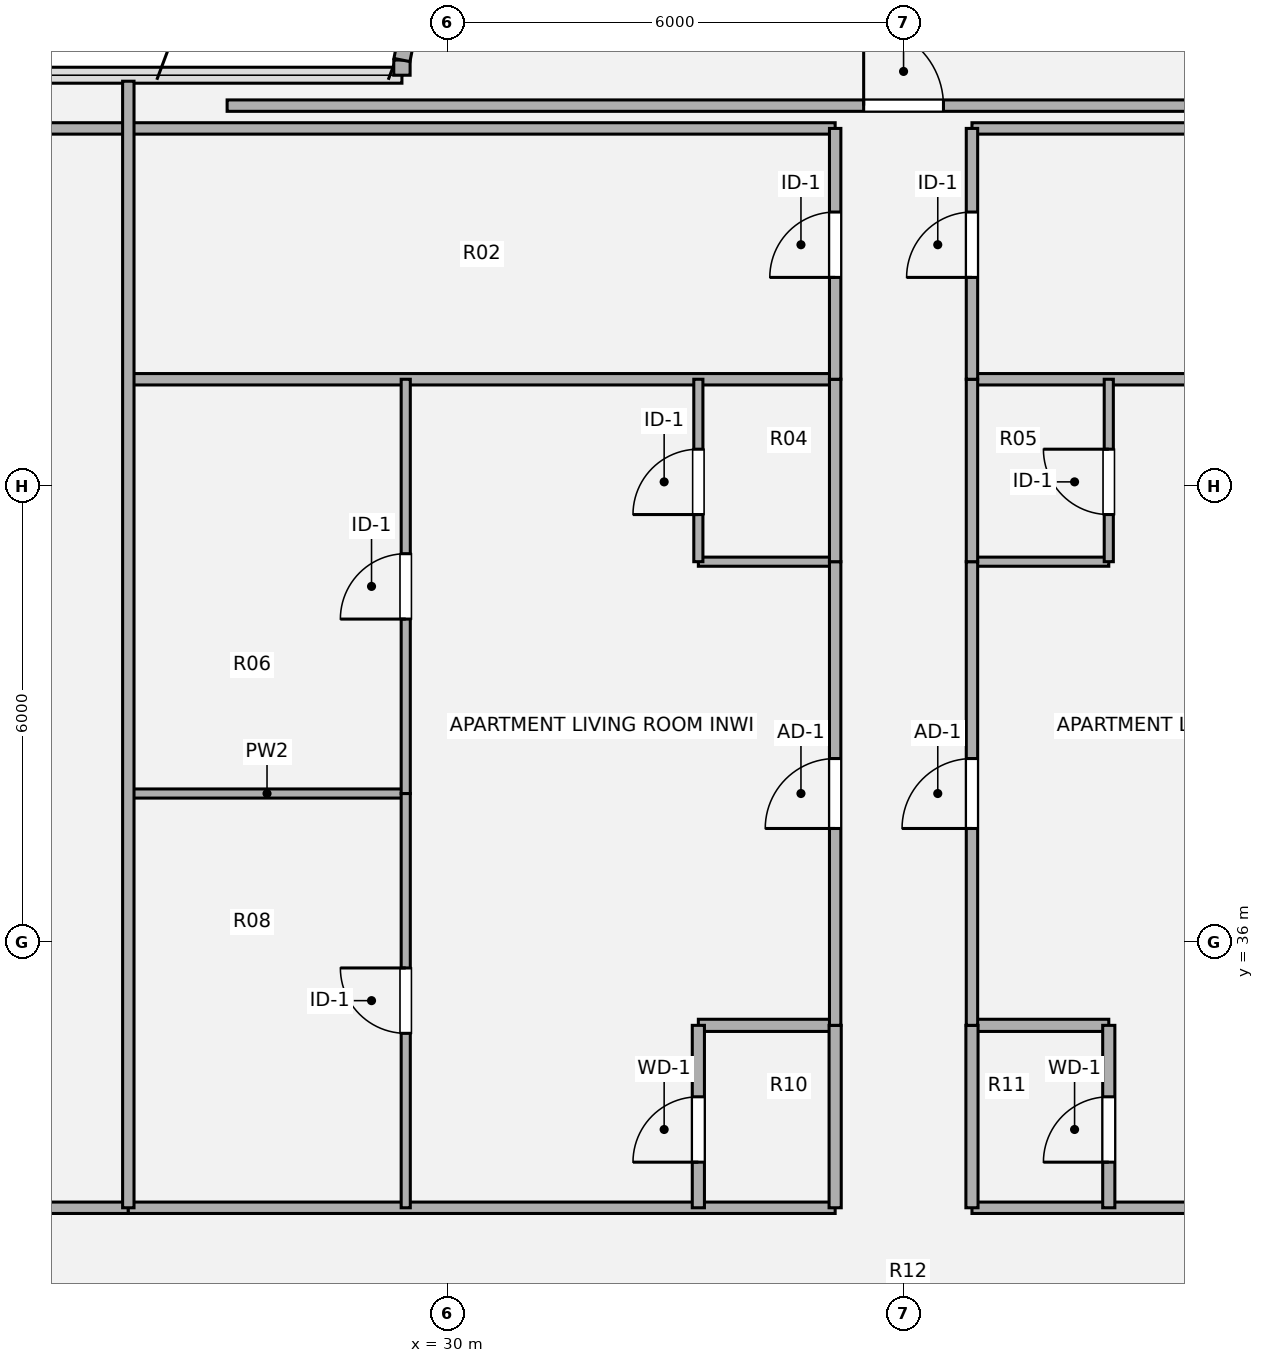
"""IFC4 building model, lengths in metres.
Left out: names, types, materials, properties, quantities, classifications, styles, units other than length and angle.
Written with IfcOpenShell. Run it as: python <this file> out.ifc"""

import sys

from ifc_helpers import new_model, si_unit, direction, frame, frame_2d, origin, origin_2d, place, context, subcontext, project, spatial, rectangle, extrude, source, transform, mapped, element, fill, save


model = new_model("IFC4")
c1 = context("Model", 3, precision=1e-05, world=origin(), true_north=direction((0.0, 1.0)))
c2 = subcontext(c1, "Body", "Model", "MODEL_VIEW")
j1 = project(units=[si_unit("LENGTHUNIT", "METRE"), si_unit("PLANEANGLEUNIT", "RADIAN")], contexts=[c1])
p1 = place(None, origin())
s1 = spatial("IfcSite", under=j1, at=p1, CompositionType="ELEMENT")
p2 = place(p1, origin())
s2 = spatial("IfcBuilding", under=s1, at=p2, CompositionType="ELEMENT")
p3 = place(p2, frame((0.0, 0.0, 138.96)))
s3 = spatial("IfcBuildingStorey", under=s2, at=p3, CompositionType="ELEMENT", Elevation=138.96)
p4 = place(p3, frame((29.4, 47.4, 0.0), z_axis=(0.0, 0.0, 1.0), x_axis=(0.0, 1.0, 0.0)))
e1 = element("IfcWall", 1, at=p4, inside=s3, PredefinedType="SOLIDWALL", context=c2, shape_type="SweptSolid", body=[
    extrude(rectangle(XDim=0.2, YDim=0.215, at=frame_2d((0.1, 0.0))), origin(), (0.0, 0.0, 1.0), 3.53),
])
p5 = place(p3, frame((29.4, 47.6, 0.0), z_axis=(0.0, 0.0, 1.0), x_axis=(0.195127417394, 0.980777900945, 0.0)))
e2 = element("IfcWall", 2, at=p5, inside=s3, PredefinedType="SOLIDWALL", context=c2, shape_type="SweptSolid", body=[
    extrude(rectangle(XDim=1.092, YDim=0.215, at=frame_2d((0.546, 0.0))), origin(), (0.0, 0.0, 1.0), 3.53),
])
p6 = place(p3, frame((13.98, 32.5, 0.0), z_axis=(0.0, 0.0, 1.0), x_axis=(1.0, 0.0, 0.0)))
e3 = element("IfcWall", 3, at=p6, inside=s3, PredefinedType="PARTITIONING", context=c2, shape_type="SweptSolid", body=[
    extrude(rectangle(XDim=11.82, YDim=0.15, at=frame_2d((5.91, 0.0))), origin(), (0.0, 0.0, 1.0), 2.982),
])
p7 = place(p6, frame((6.695, 0.0, 0.0)))
e4 = element("IfcOpeningElement", 4, at=p7, cuts=e3, PredefinedType="OPENING", context=c2, shape_type="SweptSolid", body=[
    extrude(rectangle(XDim=1.05, YDim=2.1, at=origin_2d()), frame((0.525, 0.085, 1.05), z_axis=(0.0, -1.0, 0.0), x_axis=(1.0, 0.0, 0.0)), (0.0, 0.0, 1.0), 0.17),
])
for number, where, z_axis, x_axis in (
    (5, (25.8, 32.5, 0.0), (0.0, 0.0, 1.0), (1.0, 0.0, 0.0)),
    (6, (36.9, 32.5, 0.0), (0.0, 0.0, 1.0), (1.0, 0.0, 0.0)),
):
    element("IfcWall", number, at=place(p3, frame(where, z_axis=z_axis, x_axis=x_axis)), inside=s3, PredefinedType="PARTITIONING", context=c2, shape_type="SweptSolid", body=[
        extrude(rectangle(XDim=9.3, YDim=0.15, at=frame_2d((4.65, 0.0))), origin(), (0.0, 0.0, 1.0), 2.982),
    ])
for number, where, z_axis, x_axis in (
    (7, (33.3, 34.9, 0.0), (0.0, 0.0, 1.0), (1.0, 0.0, 0.0)),
    (8, (36.9, 34.9, 0.0), (0.0, 0.0, 1.0), (1.0, 0.0, 0.0)),
):
    element("IfcWall", number, at=place(p3, frame(where, z_axis=z_axis, x_axis=x_axis)), inside=s3, PredefinedType="PLUMBINGWALL", context=c2, shape_type="SweptSolid", body=[
        extrude(rectangle(XDim=1.8, YDim=0.16, at=frame_2d((0.9, 0.0))), origin(), (0.0, 0.0, 1.0), 3.259),
    ])
p8 = place(p3, frame((25.8, 37.95, 0.0), z_axis=(0.0, 0.0, 1.0), x_axis=(1.0, 0.0, 0.0)))
e9 = element("IfcWall", 9, at=p8, inside=s3, PredefinedType="PARTITIONING", context=c2, shape_type="SweptSolid", body=[
    extrude(rectangle(XDim=3.65, YDim=0.12, at=frame_2d((1.825, 0.0))), origin(), (0.0, 0.0, 1.0), 2.982),
])
for number, where, z_axis, x_axis in (
    (10, (33.3, 41.0, 0.0), (0.0, 0.0, 1.0), (1.0, 0.0, 0.0)),
    (11, (36.9, 41.0, 0.0), (0.0, 0.0, 1.0), (1.0, 0.0, 0.0)),
):
    element("IfcWall", number, at=place(p3, frame(where, z_axis=z_axis, x_axis=x_axis)), inside=s3, PredefinedType="PARTITIONING", context=c2, shape_type="SweptSolid", body=[
        extrude(rectangle(XDim=1.8, YDim=0.12, at=frame_2d((0.9, 0.0))), origin(), (0.0, 0.0, 1.0), 3.259),
    ])
for number, where, z_axis, x_axis in (
    (12, (25.8, 43.4, 0.0), (0.0, 0.0, 1.0), (1.0, 0.0, 0.0)),
    (13, (36.9, 43.4, 0.0), (0.0, 0.0, 1.0), (1.0, 0.0, 0.0)),
):
    element("IfcWall", number, at=place(p3, frame(where, z_axis=z_axis, x_axis=x_axis)), inside=s3, PredefinedType="PARTITIONING", context=c2, shape_type="SweptSolid", body=[
        extrude(rectangle(XDim=9.3, YDim=0.15, at=frame_2d((4.65, 0.0))), origin(), (0.0, 0.0, 1.0), 3.308),
    ])
for number, where, z_axis, x_axis in (
    (14, (23.3, 46.7, 0.0), (0.0, 0.0, 1.0), (1.0, 0.0, 0.0)),
    (15, (36.9, 46.7, 0.0), (0.0, 0.0, 1.0), (1.0, 0.0, 0.0)),
):
    element("IfcWall", number, at=place(p3, frame(where, z_axis=z_axis, x_axis=x_axis)), inside=s3, PredefinedType="PARTITIONING", context=c2, shape_type="SweptSolid", body=[
        extrude(rectangle(XDim=11.8, YDim=0.15, at=frame_2d((5.9, 0.0))), origin(), (0.0, 0.0, 1.0), 3.308),
    ])
p9 = place(p3, frame((27.1, 47.0, 0.0), z_axis=(0.0, 0.0, 1.0), x_axis=(1.0, 0.0, 0.0)))
e16 = element("IfcWall", 16, at=p9, inside=s3, PredefinedType="PARTITIONING", context=c2, shape_type="SweptSolid", body=[
    extrude(rectangle(XDim=17.8, YDim=0.15, at=frame_2d((8.9, 0.0))), origin(), (0.0, 0.0, 1.0), 3.308),
])
p10 = place(p9, frame((8.375, 0.0, 0.0)))
e17 = element("IfcOpeningElement", 17, at=p10, cuts=e16, PredefinedType="OPENING", context=c2, shape_type="SweptSolid", body=[
    extrude(rectangle(XDim=1.05, YDim=2.1, at=origin_2d()), frame((0.525, 0.085, 1.05), z_axis=(0.0, -1.0, 0.0), x_axis=(1.0, 0.0, 0.0)), (0.0, 0.0, 1.0), 0.17),
])
p11 = place(p3, frame((25.8, 32.5, 0.0), z_axis=(0.0, 0.0, 1.0), x_axis=(0.0, 1.0, 0.0)))
e18 = element("IfcWall", 18, at=p11, inside=s3, PredefinedType="PARTITIONING", context=c2, shape_type="SweptSolid", body=[
    extrude(rectangle(XDim=14.821, YDim=0.15, at=frame_2d((7.411, 0.0))), origin(), (0.0, 0.0, 1.0), 3.5),
])
p12 = place(p3, frame((29.45, 32.5, 0.0), z_axis=(0.0, 0.0, 1.0), x_axis=(0.0, 1.0, 0.0)))
e19 = element("IfcWall", 19, at=p12, inside=s3, PredefinedType="PARTITIONING", context=c2, shape_type="SweptSolid", body=[
    extrude(rectangle(XDim=5.45, YDim=0.12, at=frame_2d((2.725, 0.0))), origin(), (0.0, 0.0, 1.0), 3.5),
])
p13 = place(p12, frame((2.295, 0.0, 0.0)))
e20 = element("IfcOpeningElement", 20, at=p13, cuts=e19, PredefinedType="OPENING", context=c2, shape_type="SweptSolid", body=[
    extrude(rectangle(XDim=0.86, YDim=2.1, at=origin_2d()), frame((0.43, 0.07, 1.05), z_axis=(0.0, -1.0, 0.0), x_axis=(1.0, 0.0, 0.0)), (0.0, 0.0, 1.0), 0.14),
])
p14 = place(p3, frame((29.45, 37.95, 0.0), z_axis=(0.0, 0.0, 1.0), x_axis=(0.0, 1.0, 0.0)))
e21 = element("IfcWall", 21, at=p14, inside=s3, PredefinedType="PARTITIONING", context=c2, shape_type="SweptSolid", body=[
    extrude(rectangle(XDim=5.45, YDim=0.12, at=frame_2d((2.725, 0.0))), origin(), (0.0, 0.0, 1.0), 3.5),
])
p15 = place(p14, frame((2.295, 0.0, 0.0)))
e22 = element("IfcOpeningElement", 22, at=p15, cuts=e21, PredefinedType="OPENING", context=c2, shape_type="SweptSolid", body=[
    extrude(rectangle(XDim=0.86, YDim=2.1, at=origin_2d()), frame((0.43, 0.07, 1.05), z_axis=(0.0, -1.0, 0.0), x_axis=(1.0, 0.0, 0.0)), (0.0, 0.0, 1.0), 0.14),
])
p16 = place(p3, frame((33.3, 32.5, 0.0), z_axis=(0.0, 0.0, 1.0), x_axis=(0.0, 1.0, 0.0)))
e23 = element("IfcWall", 23, at=p16, inside=s3, PredefinedType="PLUMBINGWALL", context=c2, shape_type="SweptSolid", body=[
    extrude(rectangle(XDim=2.4, YDim=0.16, at=frame_2d((1.2, 0.0))), origin(), (0.0, 0.0, 1.0), 3.5),
])
p17 = place(p16, frame((0.6, 0.0, 0.0)))
e24 = element("IfcOpeningElement", 24, at=p17, cuts=e23, PredefinedType="OPENING", context=c2, shape_type="SweptSolid", body=[
    extrude(rectangle(XDim=0.86, YDim=2.1, at=origin_2d()), frame((0.43, 0.09, 1.05), z_axis=(0.0, -1.0, 0.0), x_axis=(1.0, 0.0, 0.0)), (0.0, 0.0, 1.0), 0.18),
])
p18 = place(p3, frame((33.3, 41.0, 0.0), z_axis=(0.0, 0.0, 1.0), x_axis=(0.0, 1.0, 0.0)))
e25 = element("IfcWall", 25, at=p18, inside=s3, PredefinedType="PARTITIONING", context=c2, shape_type="SweptSolid", body=[
    extrude(rectangle(XDim=2.4, YDim=0.12, at=frame_2d((1.2, 0.0))), origin(), (0.0, 0.0, 1.0), 3.5),
])
p19 = place(p18, frame((0.62, 0.0, 0.0)))
e26 = element("IfcOpeningElement", 26, at=p19, cuts=e25, PredefinedType="OPENING", context=c2, shape_type="SweptSolid", body=[
    extrude(rectangle(XDim=0.86, YDim=2.1, at=origin_2d()), frame((0.43, 0.07, 1.05), z_axis=(0.0, -1.0, 0.0), x_axis=(1.0, 0.0, 0.0)), (0.0, 0.0, 1.0), 0.14),
])
p20 = place(p3, frame((35.1, 32.5, 0.0), z_axis=(0.0, 0.0, 1.0), x_axis=(0.0, 1.0, 0.0)))
e27 = element("IfcWall", 27, at=p20, inside=s3, PredefinedType="PLUMBINGWALL", context=c2, shape_type="SweptSolid", body=[
    extrude(rectangle(XDim=2.4, YDim=0.16, at=frame_2d((1.2, 0.0))), origin(), (0.0, 0.0, 1.0), 3.5),
])
p21 = place(p3, frame((35.1, 34.9, 0.0), z_axis=(0.0, 0.0, 1.0), x_axis=(0.0, 1.0, 0.0)))
e28 = element("IfcWall", 28, at=p21, inside=s3, PredefinedType="PARTITIONING", context=c2, shape_type="SweptSolid", body=[
    extrude(rectangle(XDim=6.1, YDim=0.15, at=frame_2d((3.05, 0.0))), origin(), (0.0, 0.0, 1.0), 3.5),
])
p22 = place(p21, frame((2.59, 0.0, 0.0)))
e29 = element("IfcOpeningElement", 29, at=p22, cuts=e28, PredefinedType="OPENING", context=c2, shape_type="SweptSolid", body=[
    extrude(rectangle(XDim=0.92, YDim=2.1, at=origin_2d()), frame((0.46, 0.085, 1.05), z_axis=(0.0, -1.0, 0.0), x_axis=(1.0, 0.0, 0.0)), (0.0, 0.0, 1.0), 0.17),
])
p23 = place(p3, frame((35.1, 41.0, 0.0), z_axis=(0.0, 0.0, 1.0), x_axis=(0.0, 1.0, 0.0)))
e30 = element("IfcWall", 30, at=p23, inside=s3, PredefinedType="PARTITIONING", context=c2, shape_type="SweptSolid", body=[
    extrude(rectangle(XDim=2.4, YDim=0.15, at=frame_2d((1.2, 0.0))), origin(), (0.0, 0.0, 1.0), 3.5),
])
p24 = place(p3, frame((35.1, 43.4, 0.0), z_axis=(0.0, 0.0, 1.0), x_axis=(0.0, 1.0, 0.0)))
e31 = element("IfcWall", 31, at=p24, inside=s3, PredefinedType="PARTITIONING", context=c2, shape_type="SweptSolid", body=[
    extrude(rectangle(XDim=3.3, YDim=0.15, at=frame_2d((1.65, 0.0))), origin(), (0.0, 0.0, 1.0), 3.5),
])
p25 = place(p24, frame((1.34, 0.0, 0.0)))
e32 = element("IfcOpeningElement", 32, at=p25, cuts=e31, PredefinedType="OPENING", context=c2, shape_type="SweptSolid", body=[
    extrude(rectangle(XDim=0.86, YDim=2.1, at=origin_2d()), frame((0.43, 0.085, 1.05), z_axis=(0.0, -1.0, 0.0), x_axis=(1.0, 0.0, 0.0)), (0.0, 0.0, 1.0), 0.17),
])
p26 = place(p3, frame((36.9, 32.5, 0.0), z_axis=(0.0, 0.0, 1.0), x_axis=(0.0, 1.0, 0.0)))
e33 = element("IfcWall", 33, at=p26, inside=s3, PredefinedType="PLUMBINGWALL", context=c2, shape_type="SweptSolid", body=[
    extrude(rectangle(XDim=2.4, YDim=0.16, at=frame_2d((1.2, 0.0))), origin(), (0.0, 0.0, 1.0), 3.5),
])
p27 = place(p3, frame((36.9, 34.9, 0.0), z_axis=(0.0, 0.0, 1.0), x_axis=(0.0, 1.0, 0.0)))
e34 = element("IfcWall", 34, at=p27, inside=s3, PredefinedType="PARTITIONING", context=c2, shape_type="SweptSolid", body=[
    extrude(rectangle(XDim=6.1, YDim=0.15, at=frame_2d((3.05, 0.0))), origin(), (0.0, 0.0, 1.0), 3.5),
])
p28 = place(p27, frame((2.59, 0.0, 0.0)))
e35 = element("IfcOpeningElement", 35, at=p28, cuts=e34, PredefinedType="OPENING", context=c2, shape_type="SweptSolid", body=[
    extrude(rectangle(XDim=0.92, YDim=2.1, at=origin_2d()), frame((0.46, 0.085, 1.05), z_axis=(0.0, -1.0, 0.0), x_axis=(1.0, 0.0, 0.0)), (0.0, 0.0, 1.0), 0.17),
])
p29 = place(p3, frame((36.9, 41.0, 0.0), z_axis=(0.0, 0.0, 1.0), x_axis=(0.0, 1.0, 0.0)))
e36 = element("IfcWall", 36, at=p29, inside=s3, PredefinedType="PARTITIONING", context=c2, shape_type="SweptSolid", body=[
    extrude(rectangle(XDim=2.4, YDim=0.15, at=frame_2d((1.2, 0.0))), origin(), (0.0, 0.0, 1.0), 3.5),
])
p30 = place(p3, frame((36.9, 43.4, 0.0), z_axis=(0.0, 0.0, 1.0), x_axis=(0.0, 1.0, 0.0)))
e37 = element("IfcWall", 37, at=p30, inside=s3, PredefinedType="PARTITIONING", context=c2, shape_type="SweptSolid", body=[
    extrude(rectangle(XDim=3.3, YDim=0.15, at=frame_2d((1.65, 0.0))), origin(), (0.0, 0.0, 1.0), 3.5),
])
p31 = place(p30, frame((1.34, 0.0, 0.0)))
e38 = element("IfcOpeningElement", 38, at=p31, cuts=e37, PredefinedType="OPENING", context=c2, shape_type="SweptSolid", body=[
    extrude(rectangle(XDim=0.86, YDim=2.1, at=origin_2d()), frame((0.43, 0.085, 1.05), z_axis=(0.0, -1.0, 0.0), x_axis=(1.0, 0.0, 0.0)), (0.0, 0.0, 1.0), 0.17),
])
p32 = place(p3, frame((38.7, 32.5, 0.0), z_axis=(0.0, 0.0, 1.0), x_axis=(0.0, 1.0, 0.0)))
e39 = element("IfcWall", 39, at=p32, inside=s3, PredefinedType="PLUMBINGWALL", context=c2, shape_type="SweptSolid", body=[
    extrude(rectangle(XDim=2.4, YDim=0.16, at=frame_2d((1.2, 0.0))), origin(), (0.0, 0.0, 1.0), 3.5),
])
p33 = place(p32, frame((0.6, 0.0, 0.0)))
e40 = element("IfcOpeningElement", 40, at=p33, cuts=e39, PredefinedType="OPENING", context=c2, shape_type="SweptSolid", body=[
    extrude(rectangle(XDim=0.86, YDim=2.1, at=origin_2d()), frame((0.43, 0.09, 1.05), z_axis=(0.0, -1.0, 0.0), x_axis=(1.0, 0.0, 0.0)), (0.0, 0.0, 1.0), 0.18),
])
p34 = place(p3, frame((38.7, 41.0, 0.0), z_axis=(0.0, 0.0, 1.0), x_axis=(0.0, 1.0, 0.0)))
e41 = element("IfcWall", 41, at=p34, inside=s3, PredefinedType="PARTITIONING", context=c2, shape_type="SweptSolid", body=[
    extrude(rectangle(XDim=2.4, YDim=0.12, at=frame_2d((1.2, 0.0))), origin(), (0.0, 0.0, 1.0), 3.5),
])
p35 = place(p34, frame((0.62, 0.0, 0.0)))
e42 = element("IfcOpeningElement", 42, at=p35, cuts=e41, PredefinedType="OPENING", context=c2, shape_type="SweptSolid", body=[
    extrude(rectangle(XDim=0.86, YDim=2.1, at=origin_2d()), frame((0.43, 0.07, 1.05), z_axis=(0.0, -1.0, 0.0), x_axis=(1.0, 0.0, 0.0)), (0.0, 0.0, 1.0), 0.14),
])
m1 = source(origin(), c2, "Body", "SweptSolid", [
    extrude(rectangle(XDim=1.05, YDim=2.1, at=origin_2d()), frame((0.525, 0.025, 1.05), z_axis=(0.0, -1.0, 0.0), x_axis=(1.0, 0.0, 0.0)), (0.0, 0.0, 1.0), 0.05),
])
p36 = place(p10, origin())
e43 = element("IfcDoor", 43, at=p36, inside=s3, OperationType="SINGLE_SWING_LEFT", PredefinedType="DOOR", context=c2, shape_type="MappedRepresentation", body=[
    mapped(m1, transform((0.0, 0.0, 0.0), x_axis=(1.0, 0.0, 0.0), y_axis=(0.0, 1.0, 0.0), z_axis=(0.0, 0.0, 1.0), scale=1.0)),
])
fill(e17, e43)
m2 = source(origin(), c2, "Body", "SweptSolid", [
    extrude(rectangle(XDim=0.86, YDim=2.1, at=origin_2d()), frame((0.43, 0.025, 1.05), z_axis=(0.0, -1.0, 0.0), x_axis=(1.0, 0.0, 0.0)), (0.0, 0.0, 1.0), 0.05),
])
p37 = place(p13, origin())
e44 = element("IfcDoor", 44, at=p37, inside=s3, OperationType="SINGLE_SWING_RIGHT", PredefinedType="DOOR", context=c2, shape_type="MappedRepresentation", body=[
    mapped(m2, transform((0.0, 0.0, 0.0), x_axis=(1.0, 0.0, 0.0), y_axis=(0.0, 1.0, 0.0), z_axis=(0.0, 0.0, 1.0), scale=1.0)),
])
fill(e20, e44)
p38 = place(p15, origin())
e45 = element("IfcDoor", 45, at=p38, inside=s3, OperationType="SINGLE_SWING_LEFT", PredefinedType="DOOR", context=c2, shape_type="MappedRepresentation", body=[
    mapped(m2, transform((0.0, 0.0, 0.0), x_axis=(1.0, 0.0, 0.0), y_axis=(0.0, 1.0, 0.0), z_axis=(0.0, 0.0, 1.0), scale=1.0)),
])
fill(e22, e45)
m3 = source(origin(), c2, "Body", "SweptSolid", [
    extrude(rectangle(XDim=0.86, YDim=2.1, at=origin_2d()), frame((0.43, 0.025, 1.05), z_axis=(0.0, -1.0, 0.0), x_axis=(1.0, 0.0, 0.0)), (0.0, 0.0, 1.0), 0.05),
])
p39 = place(p17, origin())
e46 = element("IfcDoor", 46, at=p39, inside=s3, OperationType="SINGLE_SWING_LEFT", PredefinedType="DOOR", context=c2, shape_type="MappedRepresentation", body=[
    mapped(m3, transform((0.0, 0.0, 0.0), x_axis=(1.0, 0.0, 0.0), y_axis=(0.0, 1.0, 0.0), z_axis=(0.0, 0.0, 1.0), scale=1.0)),
])
fill(e24, e46)
p40 = place(p19, origin())
e47 = element("IfcDoor", 47, at=p40, inside=s3, OperationType="SINGLE_SWING_LEFT", PredefinedType="DOOR", context=c2, shape_type="MappedRepresentation", body=[
    mapped(m2, transform((0.0, 0.0, 0.0), x_axis=(1.0, 0.0, 0.0), y_axis=(0.0, 1.0, 0.0), z_axis=(0.0, 0.0, 1.0), scale=1.0)),
])
fill(e26, e47)
m4 = source(origin(), c2, "Body", "SweptSolid", [
    extrude(rectangle(XDim=0.92, YDim=2.1, at=origin_2d()), frame((0.46, 0.025, 1.05), z_axis=(0.0, -1.0, 0.0), x_axis=(1.0, 0.0, 0.0)), (0.0, 0.0, 1.0), 0.05),
])
p41 = place(p22, origin())
e48 = element("IfcDoor", 48, at=p41, inside=s3, OperationType="SINGLE_SWING_LEFT", PredefinedType="DOOR", context=c2, shape_type="MappedRepresentation", body=[
    mapped(m4, transform((0.0, 0.0, 0.0), x_axis=(1.0, 0.0, 0.0), y_axis=(0.0, 1.0, 0.0), z_axis=(0.0, 0.0, 1.0), scale=1.0)),
])
fill(e29, e48)
p42 = place(p25, origin())
e49 = element("IfcDoor", 49, at=p42, inside=s3, OperationType="SINGLE_SWING_LEFT", PredefinedType="DOOR", context=c2, shape_type="MappedRepresentation", body=[
    mapped(m2, transform((0.0, 0.0, 0.0), x_axis=(1.0, 0.0, 0.0), y_axis=(0.0, 1.0, 0.0), z_axis=(0.0, 0.0, 1.0), scale=1.0)),
])
fill(e32, e49)
p43 = place(p28, origin())
e50 = element("IfcDoor", 50, at=p43, inside=s3, OperationType="SINGLE_SWING_LEFT", PredefinedType="DOOR", context=c2, shape_type="MappedRepresentation", body=[
    mapped(m4, transform((0.0, 0.0, 0.0), x_axis=(1.0, 0.0, 0.0), y_axis=(0.0, 1.0, 0.0), z_axis=(0.0, 0.0, 1.0), scale=1.0)),
])
fill(e35, e50)
p44 = place(p31, origin())
e51 = element("IfcDoor", 51, at=p44, inside=s3, OperationType="SINGLE_SWING_LEFT", PredefinedType="DOOR", context=c2, shape_type="MappedRepresentation", body=[
    mapped(m2, transform((0.0, 0.0, 0.0), x_axis=(1.0, 0.0, 0.0), y_axis=(0.0, 1.0, 0.0), z_axis=(0.0, 0.0, 1.0), scale=1.0)),
])
fill(e38, e51)
p45 = place(p33, origin())
e52 = element("IfcDoor", 52, at=p45, inside=s3, OperationType="SINGLE_SWING_LEFT", PredefinedType="DOOR", context=c2, shape_type="MappedRepresentation", body=[
    mapped(m3, transform((0.0, 0.0, 0.0), x_axis=(1.0, 0.0, 0.0), y_axis=(0.0, 1.0, 0.0), z_axis=(0.0, 0.0, 1.0), scale=1.0)),
])
fill(e40, e52)
p46 = place(p35, origin())
e53 = element("IfcDoor", 53, at=p46, inside=s3, OperationType="SINGLE_SWING_RIGHT", PredefinedType="DOOR", context=c2, shape_type="MappedRepresentation", body=[
    mapped(m2, transform((0.0, 0.0, 0.0), x_axis=(1.0, 0.0, 0.0), y_axis=(0.0, 1.0, 0.0), z_axis=(0.0, 0.0, 1.0), scale=1.0)),
])
fill(e42, e53)
save(model, sys.argv[1])
